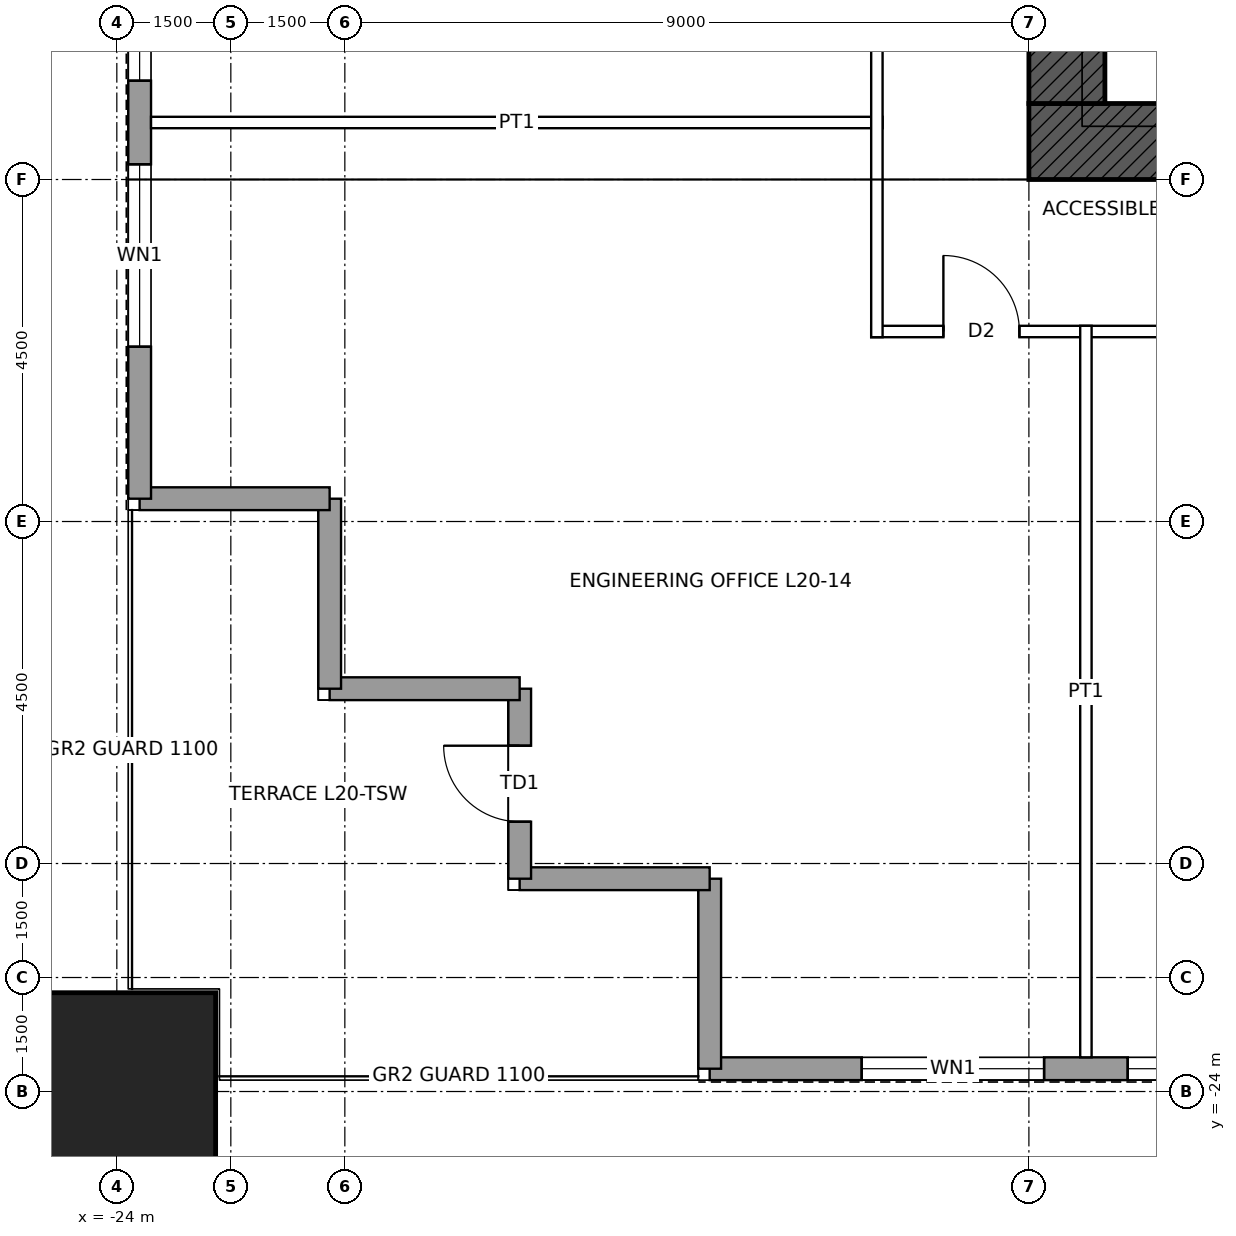
"""IFC4 building model, lengths in metres.
Left out: names, types, materials, properties, quantities, classifications, styles, units other than length and angle.
Written with IfcOpenShell. Run it as: python <this file> out.ifc"""

import sys

from ifc_helpers import new_model, si_unit, direction, frame, frame_2d, origin, origin_2d, place, context, subcontext, project, spatial, rectangle, hollow_rectangle, extrude, element, fill, save


model = new_model("IFC4")
c1 = context("Model", 3, precision=1e-05, world=origin(), true_north=direction((0.0, 1.0)))
c2 = subcontext(c1, "Body", "Model", "MODEL_VIEW")
j1 = project(units=[si_unit("LENGTHUNIT", "METRE"), si_unit("PLANEANGLEUNIT", "RADIAN")], contexts=[c1])
p1 = place(None, origin())
s1 = spatial("IfcSite", under=j1, at=p1, CompositionType="ELEMENT")
p2 = place(p1, origin())
s2 = spatial("IfcBuilding", under=s1, at=p2, CompositionType="ELEMENT")
p3 = place(p2, frame((0.0, 0.0, 104.4)))
s3 = spatial("IfcBuildingStorey", under=s2, at=p3, CompositionType="ELEMENT", Elevation=104.4)
p4 = place(p3, frame((-24.0, -24.0, 0.0), z_axis=(0.0, 0.0, 1.0), x_axis=(1.0, 0.0, 0.0)))
e1 = element("IfcColumn", 1, at=p4, inside=s3, PredefinedType="COLUMN", context=c2, shape_type="SweptSolid", body=[
    extrude(hollow_rectangle(XDim=2.6, YDim=2.6, WallThickness=0.13, at=origin_2d()), origin(), (0.0, 0.0, 1.0), 4.5),
])
p5 = place(p3, frame((12.0, -11.5, 0.0), z_axis=(0.0, 0.0, 1.0), x_axis=(-1.0, 0.0, 0.0)))
e2 = element("IfcWall", 2, at=p5, inside=s3, PredefinedType="SHEAR", context=c2, shape_type="SweptSolid", body=[
    extrude(rectangle(XDim=24.0, YDim=1.0, at=frame_2d((12.0, 0.0))), origin(), (0.0, 0.0, 1.0), 4.5),
])
p6 = place(p5, frame((11.5, 0.0, 0.0)))
e3 = element("IfcOpeningElement", 3, at=p6, cuts=e2, PredefinedType="OPENING", context=c2, shape_type="SweptSolid", body=[
    extrude(rectangle(XDim=1.0, YDim=2.1, at=frame_2d((0.5, 1.05))), frame((0.0, 0.51, 0.0), z_axis=(0.0, -1.0, 0.0), x_axis=(1.0, 0.0, 0.0)), (0.0, 0.0, 1.0), 1.02),
])
p7 = place(p5, frame((1.0, 0.0, 0.0)))
e4 = element("IfcOpeningElement", 4, at=p7, cuts=e2, PredefinedType="OPENING", context=c2, shape_type="SweptSolid", body=[
    extrude(rectangle(XDim=1.0, YDim=2.4, at=frame_2d((0.5, 1.2))), frame((0.0, 0.51, 0.0), z_axis=(0.0, -1.0, 0.0), x_axis=(1.0, 0.0, 0.0)), (0.0, 0.0, 1.0), 1.02),
])
p8 = place(p3, frame((-11.5, -11.0, 0.0), z_axis=(0.0, 0.0, 1.0), x_axis=(0.0, 1.0, 0.0)))
e5 = element("IfcWall", 5, at=p8, inside=s3, PredefinedType="SHEAR", context=c2, shape_type="SweptSolid", body=[
    extrude(rectangle(XDim=22.0, YDim=1.0, at=frame_2d((11.0, 0.0))), origin(), (0.0, 0.0, 1.0), 4.5),
])
p9 = place(p8, frame((10.5, 0.0, 0.0)))
e6 = element("IfcOpeningElement", 6, at=p9, cuts=e5, PredefinedType="OPENING", context=c2, shape_type="SweptSolid", body=[
    extrude(rectangle(XDim=1.0, YDim=2.4, at=frame_2d((0.5, 1.2))), frame((0.0, 0.51, 0.0), z_axis=(0.0, -1.0, 0.0), x_axis=(1.0, 0.0, 0.0)), (0.0, 0.0, 1.0), 1.02),
])
p10 = place(p3, frame((16.2, -23.7, 0.0), z_axis=(0.0, 0.0, 1.0), x_axis=(-1.0, 0.0, 0.0)))
e7 = element("IfcWall", 7, at=p10, inside=s3, PredefinedType="SOLIDWALL", context=c2, shape_type="SweptSolid", body=[
    extrude(rectangle(XDim=32.4, YDim=0.3, at=frame_2d((16.2, 0.0))), origin(), (0.0, 0.0, 1.0), 4.3),
])
p11 = place(p10, frame((2.0, 0.0, 1.0)))
e8 = element("IfcOpeningElement", 8, at=p11, cuts=e7, PredefinedType="OPENING", context=c2, shape_type="SweptSolid", body=[
    extrude(rectangle(XDim=2.4, YDim=1.2, at=frame_2d((1.2, 0.6))), frame((0.0, 0.16, 0.0), z_axis=(0.0, -1.0, 0.0), x_axis=(1.0, 0.0, 0.0)), (0.0, 0.0, 1.0), 0.32),
])
p12 = place(p10, frame((5.5, 0.0, 1.0)))
e9 = element("IfcOpeningElement", 9, at=p12, cuts=e7, PredefinedType="OPENING", context=c2, shape_type="SweptSolid", body=[
    extrude(rectangle(XDim=2.4, YDim=1.2, at=frame_2d((1.2, 0.6))), frame((0.0, 0.16, 0.0), z_axis=(0.0, -1.0, 0.0), x_axis=(1.0, 0.0, 0.0)), (0.0, 0.0, 1.0), 0.32),
])
p13 = place(p10, frame((9.5, 0.0, 1.0)))
e10 = element("IfcOpeningElement", 10, at=p13, cuts=e7, PredefinedType="OPENING", context=c2, shape_type="SweptSolid", body=[
    extrude(rectangle(XDim=2.4, YDim=1.2, at=frame_2d((1.2, 0.6))), frame((0.0, 0.16, 0.0), z_axis=(0.0, -1.0, 0.0), x_axis=(1.0, 0.0, 0.0)), (0.0, 0.0, 1.0), 0.32),
])
p14 = place(p10, frame((13.0, 0.0, 1.0)))
e11 = element("IfcOpeningElement", 11, at=p14, cuts=e7, PredefinedType="OPENING", context=c2, shape_type="SweptSolid", body=[
    extrude(rectangle(XDim=2.4, YDim=1.2, at=frame_2d((1.2, 0.6))), frame((0.0, 0.16, 0.0), z_axis=(0.0, -1.0, 0.0), x_axis=(1.0, 0.0, 0.0)), (0.0, 0.0, 1.0), 0.32),
])
p15 = place(p10, frame((17.0, 0.0, 1.0)))
e12 = element("IfcOpeningElement", 12, at=p15, cuts=e7, PredefinedType="OPENING", context=c2, shape_type="SweptSolid", body=[
    extrude(rectangle(XDim=2.4, YDim=1.2, at=frame_2d((1.2, 0.6))), frame((0.0, 0.16, 0.0), z_axis=(0.0, -1.0, 0.0), x_axis=(1.0, 0.0, 0.0)), (0.0, 0.0, 1.0), 0.32),
])
p16 = place(p10, frame((20.5, 0.0, 1.0)))
e13 = element("IfcOpeningElement", 13, at=p16, cuts=e7, PredefinedType="OPENING", context=c2, shape_type="SweptSolid", body=[
    extrude(rectangle(XDim=2.4, YDim=1.2, at=frame_2d((1.2, 0.6))), frame((0.0, 0.16, 0.0), z_axis=(0.0, -1.0, 0.0), x_axis=(1.0, 0.0, 0.0)), (0.0, 0.0, 1.0), 0.32),
])
p17 = place(p10, frame((24.5, 0.0, 1.0)))
e14 = element("IfcOpeningElement", 14, at=p17, cuts=e7, PredefinedType="OPENING", context=c2, shape_type="SweptSolid", body=[
    extrude(rectangle(XDim=2.4, YDim=1.2, at=frame_2d((1.2, 0.6))), frame((0.0, 0.16, 0.0), z_axis=(0.0, -1.0, 0.0), x_axis=(1.0, 0.0, 0.0)), (0.0, 0.0, 1.0), 0.32),
])
p18 = place(p10, frame((28.0, 0.0, 1.0)))
e15 = element("IfcOpeningElement", 15, at=p18, cuts=e7, PredefinedType="OPENING", context=c2, shape_type="SweptSolid", body=[
    extrude(rectangle(XDim=2.4, YDim=1.2, at=frame_2d((1.2, 0.6))), frame((0.0, 0.16, 0.0), z_axis=(0.0, -1.0, 0.0), x_axis=(1.0, 0.0, 0.0)), (0.0, 0.0, 1.0), 0.32),
])
for number, where, z_axis, x_axis in (
    (16, (-16.2, -23.7, 0.0), (0.0, 0.0, 1.0), (0.0, 1.0, 0.0)),
    (17, (-16.2, -21.2, 0.0), (0.0, 0.0, 1.0), (-1.0, 0.0, 0.0)),
):
    element("IfcWall", number, at=place(p3, frame(where, z_axis=z_axis, x_axis=x_axis)), inside=s3, PredefinedType="SOLIDWALL", context=c2, shape_type="SweptSolid", body=[
        extrude(rectangle(XDim=2.5, YDim=0.3, at=frame_2d((1.25, 0.0))), origin(), (0.0, 0.0, 1.0), 4.3),
    ])
p19 = place(p3, frame((-18.7, -21.2, 0.0), z_axis=(0.0, 0.0, 1.0), x_axis=(0.0, 1.0, 0.0)))
e18 = element("IfcWall", 18, at=p19, inside=s3, PredefinedType="SOLIDWALL", context=c2, shape_type="SweptSolid", body=[
    extrude(rectangle(XDim=2.5, YDim=0.3, at=frame_2d((1.25, 0.0))), origin(), (0.0, 0.0, 1.0), 4.3),
])
p20 = place(p19, frame((0.75, 0.0, 0.0)))
e19 = element("IfcOpeningElement", 19, at=p20, cuts=e18, PredefinedType="OPENING", context=c2, shape_type="SweptSolid", body=[
    extrude(rectangle(XDim=1.0, YDim=2.4, at=frame_2d((0.5, 1.2))), frame((0.0, 0.16, 0.0), z_axis=(0.0, -1.0, 0.0), x_axis=(1.0, 0.0, 0.0)), (0.0, 0.0, 1.0), 0.32),
])
for number, where, z_axis, x_axis in (
    (20, (-18.7, -18.7, 0.0), (0.0, 0.0, 1.0), (-1.0, 0.0, 0.0)),
    (21, (-21.2, -18.7, 0.0), (0.0, 0.0, 1.0), (0.0, 1.0, 0.0)),
    (22, (-21.2, -16.2, 0.0), (0.0, 0.0, 1.0), (-1.0, 0.0, 0.0)),
):
    element("IfcWall", number, at=place(p3, frame(where, z_axis=z_axis, x_axis=x_axis)), inside=s3, PredefinedType="SOLIDWALL", context=c2, shape_type="SweptSolid", body=[
        extrude(rectangle(XDim=2.5, YDim=0.3, at=frame_2d((1.25, 0.0))), origin(), (0.0, 0.0, 1.0), 4.3),
    ])
p21 = place(p3, frame((-23.7, -16.2, 0.0), z_axis=(0.0, 0.0, 1.0), x_axis=(0.0, 1.0, 0.0)))
e23 = element("IfcWall", 23, at=p21, inside=s3, PredefinedType="SOLIDWALL", context=c2, shape_type="SweptSolid", body=[
    extrude(rectangle(XDim=32.4, YDim=0.3, at=frame_2d((16.2, 0.0))), origin(), (0.0, 0.0, 1.0), 4.3),
])
p22 = place(p21, frame((2.0, 0.0, 1.0)))
e24 = element("IfcOpeningElement", 24, at=p22, cuts=e23, PredefinedType="OPENING", context=c2, shape_type="SweptSolid", body=[
    extrude(rectangle(XDim=2.4, YDim=1.2, at=frame_2d((1.2, 0.6))), frame((0.0, 0.16, 0.0), z_axis=(0.0, -1.0, 0.0), x_axis=(1.0, 0.0, 0.0)), (0.0, 0.0, 1.0), 0.32),
])
p23 = place(p21, frame((5.5, 0.0, 1.0)))
e25 = element("IfcOpeningElement", 25, at=p23, cuts=e23, PredefinedType="OPENING", context=c2, shape_type="SweptSolid", body=[
    extrude(rectangle(XDim=2.4, YDim=1.2, at=frame_2d((1.2, 0.6))), frame((0.0, 0.16, 0.0), z_axis=(0.0, -1.0, 0.0), x_axis=(1.0, 0.0, 0.0)), (0.0, 0.0, 1.0), 0.32),
])
p24 = place(p21, frame((9.5, 0.0, 1.0)))
e26 = element("IfcOpeningElement", 26, at=p24, cuts=e23, PredefinedType="OPENING", context=c2, shape_type="SweptSolid", body=[
    extrude(rectangle(XDim=2.4, YDim=1.2, at=frame_2d((1.2, 0.6))), frame((0.0, 0.16, 0.0), z_axis=(0.0, -1.0, 0.0), x_axis=(1.0, 0.0, 0.0)), (0.0, 0.0, 1.0), 0.32),
])
p25 = place(p21, frame((13.0, 0.0, 1.0)))
e27 = element("IfcOpeningElement", 27, at=p25, cuts=e23, PredefinedType="OPENING", context=c2, shape_type="SweptSolid", body=[
    extrude(rectangle(XDim=2.4, YDim=1.2, at=frame_2d((1.2, 0.6))), frame((0.0, 0.16, 0.0), z_axis=(0.0, -1.0, 0.0), x_axis=(1.0, 0.0, 0.0)), (0.0, 0.0, 1.0), 0.32),
])
p26 = place(p21, frame((17.0, 0.0, 1.0)))
e28 = element("IfcOpeningElement", 28, at=p26, cuts=e23, PredefinedType="OPENING", context=c2, shape_type="SweptSolid", body=[
    extrude(rectangle(XDim=2.4, YDim=1.2, at=frame_2d((1.2, 0.6))), frame((0.0, 0.16, 0.0), z_axis=(0.0, -1.0, 0.0), x_axis=(1.0, 0.0, 0.0)), (0.0, 0.0, 1.0), 0.32),
])
p27 = place(p21, frame((20.5, 0.0, 1.0)))
e29 = element("IfcOpeningElement", 29, at=p27, cuts=e23, PredefinedType="OPENING", context=c2, shape_type="SweptSolid", body=[
    extrude(rectangle(XDim=2.4, YDim=1.2, at=frame_2d((1.2, 0.6))), frame((0.0, 0.16, 0.0), z_axis=(0.0, -1.0, 0.0), x_axis=(1.0, 0.0, 0.0)), (0.0, 0.0, 1.0), 0.32),
])
p28 = place(p21, frame((24.5, 0.0, 1.0)))
e30 = element("IfcOpeningElement", 30, at=p28, cuts=e23, PredefinedType="OPENING", context=c2, shape_type="SweptSolid", body=[
    extrude(rectangle(XDim=2.4, YDim=1.2, at=frame_2d((1.2, 0.6))), frame((0.0, 0.16, 0.0), z_axis=(0.0, -1.0, 0.0), x_axis=(1.0, 0.0, 0.0)), (0.0, 0.0, 1.0), 0.32),
])
p29 = place(p21, frame((28.0, 0.0, 1.0)))
e31 = element("IfcOpeningElement", 31, at=p29, cuts=e23, PredefinedType="OPENING", context=c2, shape_type="SweptSolid", body=[
    extrude(rectangle(XDim=2.4, YDim=1.2, at=frame_2d((1.2, 0.6))), frame((0.0, 0.16, 0.0), z_axis=(0.0, -1.0, 0.0), x_axis=(1.0, 0.0, 0.0)), (0.0, 0.0, 1.0), 0.32),
])
p30 = place(p3, frame((-14.075, -14.0, 0.0), z_axis=(0.0, 0.0, 1.0), x_axis=(1.0, 0.0, 0.0)))
e32 = element("IfcWall", 32, at=p30, inside=s3, PredefinedType="PARTITIONING", context=c2, shape_type="SweptSolid", body=[
    extrude(rectangle(XDim=28.15, YDim=0.15, at=frame_2d((14.075, 0.0))), origin(), (0.0, 0.0, 1.0), 4.3),
])
p31 = place(p30, frame((20.675, 0.0, 0.0)))
e33 = element("IfcOpeningElement", 33, at=p31, cuts=e32, PredefinedType="OPENING", context=c2, shape_type="SweptSolid", body=[
    extrude(rectangle(XDim=1.8, YDim=2.4, at=frame_2d((0.9, 1.2))), frame((0.0, 0.085, 0.0), z_axis=(0.0, -1.0, 0.0), x_axis=(1.0, 0.0, 0.0)), (0.0, 0.0, 1.0), 0.17),
])
p32 = place(p30, frame((13.175, 0.0, 0.0)))
e34 = element("IfcOpeningElement", 34, at=p32, cuts=e32, PredefinedType="OPENING", context=c2, shape_type="SweptSolid", body=[
    extrude(rectangle(XDim=1.8, YDim=2.4, at=frame_2d((0.9, 1.2))), frame((0.0, 0.085, 0.0), z_axis=(0.0, -1.0, 0.0), x_axis=(1.0, 0.0, 0.0)), (0.0, 0.0, 1.0), 0.17),
])
p33 = place(p30, frame((5.675, 0.0, 0.0)))
e35 = element("IfcOpeningElement", 35, at=p33, cuts=e32, PredefinedType="OPENING", context=c2, shape_type="SweptSolid", body=[
    extrude(rectangle(XDim=1.8, YDim=2.4, at=frame_2d((0.9, 1.2))), frame((0.0, 0.085, 0.0), z_axis=(0.0, -1.0, 0.0), x_axis=(1.0, 0.0, 0.0)), (0.0, 0.0, 1.0), 0.17),
])
p34 = place(p30, frame((26.2, 0.0, 0.0)))
e36 = element("IfcOpeningElement", 36, at=p34, cuts=e32, PredefinedType="OPENING", context=c2, shape_type="SweptSolid", body=[
    extrude(rectangle(XDim=1.0, YDim=2.1, at=frame_2d((0.5, 1.05))), frame((0.0, 0.085, 0.0), z_axis=(0.0, -1.0, 0.0), x_axis=(1.0, 0.0, 0.0)), (0.0, 0.0, 1.0), 0.17),
])
p35 = place(p30, frame((0.95, 0.0, 0.0)))
e37 = element("IfcOpeningElement", 37, at=p35, cuts=e32, PredefinedType="OPENING", context=c2, shape_type="SweptSolid", body=[
    extrude(rectangle(XDim=1.0, YDim=2.1, at=frame_2d((0.5, 1.05))), frame((0.0, 0.085, 0.0), z_axis=(0.0, -1.0, 0.0), x_axis=(1.0, 0.0, 0.0)), (0.0, 0.0, 1.0), 0.17),
])
p36 = place(p3, frame((-23.55, -11.25, 0.0), z_axis=(0.0, 0.0, 1.0), x_axis=(1.0, 0.0, 0.0)))
e38 = element("IfcWall", 38, at=p36, inside=s3, PredefinedType="PARTITIONING", context=c2, shape_type="SweptSolid", body=[
    extrude(rectangle(XDim=9.625, YDim=0.15, at=frame_2d((4.812, 0.0))), origin(), (0.0, 0.0, 1.0), 3.431),
])
p37 = place(p3, frame((-14.0, -14.075, 0.0), z_axis=(0.0, 0.0, 1.0), x_axis=(0.0, 1.0, 0.0)))
e39 = element("IfcWall", 39, at=p37, inside=s3, PredefinedType="PARTITIONING", context=c2, shape_type="SweptSolid", body=[
    extrude(rectangle(XDim=28.15, YDim=0.15, at=frame_2d((14.075, 0.0))), origin(), (0.0, 0.0, 1.0), 4.3),
])
p38 = place(p37, frame((6.075, 0.0, 0.0)))
e40 = element("IfcOpeningElement", 40, at=p38, cuts=e39, PredefinedType="OPENING", context=c2, shape_type="SweptSolid", body=[
    extrude(rectangle(XDim=1.0, YDim=2.1, at=frame_2d((0.5, 1.05))), frame((0.0, 0.085, 0.0), z_axis=(0.0, -1.0, 0.0), x_axis=(1.0, 0.0, 0.0)), (0.0, 0.0, 1.0), 0.17),
])
p39 = place(p37, frame((16.925, 0.0, 0.0)))
e41 = element("IfcOpeningElement", 41, at=p39, cuts=e39, PredefinedType="OPENING", context=c2, shape_type="SweptSolid", body=[
    extrude(rectangle(XDim=1.8, YDim=2.4, at=frame_2d((0.9, 1.2))), frame((0.0, 0.085, 0.0), z_axis=(0.0, -1.0, 0.0), x_axis=(1.0, 0.0, 0.0)), (0.0, 0.0, 1.0), 0.17),
])
p40 = place(p3, frame((-11.25, -23.55, 0.0), z_axis=(0.0, 0.0, 1.0), x_axis=(0.0, 1.0, 0.0)))
e42 = element("IfcWall", 42, at=p40, inside=s3, PredefinedType="PARTITIONING", context=c2, shape_type="SweptSolid", body=[
    extrude(rectangle(XDim=9.625, YDim=0.15, at=frame_2d((4.812, 0.0))), origin(), (0.0, 0.0, 1.0), 3.431),
])
p41 = place(p17, origin())
e43 = element("IfcWindow", 43, at=p41, inside=s3, PartitioningType="SINGLE_PANEL", PredefinedType="WINDOW", context=c2, shape_type="SweptSolid", body=[
    extrude(rectangle(XDim=2.4, YDim=1.2, at=frame_2d((1.2, 0.6))), frame((0.0, 0.03, 0.0), z_axis=(0.0, -1.0, 0.0), x_axis=(1.0, 0.0, 0.0)), (0.0, 0.0, 1.0), 0.06),
])
fill(e14, e43)
p42 = place(p18, origin())
e44 = element("IfcWindow", 44, at=p42, inside=s3, PartitioningType="SINGLE_PANEL", PredefinedType="WINDOW", context=c2, shape_type="SweptSolid", body=[
    extrude(rectangle(XDim=2.4, YDim=1.2, at=frame_2d((1.2, 0.6))), frame((0.0, 0.03, 0.0), z_axis=(0.0, -1.0, 0.0), x_axis=(1.0, 0.0, 0.0)), (0.0, 0.0, 1.0), 0.06),
])
fill(e15, e44)
p43 = place(p20, origin())
e45 = element("IfcDoor", 45, at=p43, inside=s3, OperationType="SINGLE_SWING_RIGHT", PredefinedType="DOOR", context=c2, shape_type="SweptSolid", body=[
    extrude(rectangle(XDim=1.0, YDim=2.4, at=frame_2d((0.5, 1.2))), frame((0.0, 0.025, 0.0), z_axis=(0.0, -1.0, 0.0), x_axis=(1.0, 0.0, 0.0)), (0.0, 0.0, 1.0), 0.05),
])
fill(e19, e45)
p44 = place(p22, origin())
e46 = element("IfcWindow", 46, at=p44, inside=s3, PartitioningType="SINGLE_PANEL", PredefinedType="WINDOW", context=c2, shape_type="SweptSolid", body=[
    extrude(rectangle(XDim=2.4, YDim=1.2, at=frame_2d((1.2, 0.6))), frame((0.0, 0.03, 0.0), z_axis=(0.0, -1.0, 0.0), x_axis=(1.0, 0.0, 0.0)), (0.0, 0.0, 1.0), 0.06),
])
fill(e24, e46)
p45 = place(p23, origin())
e47 = element("IfcWindow", 47, at=p45, inside=s3, PartitioningType="SINGLE_PANEL", PredefinedType="WINDOW", context=c2, shape_type="SweptSolid", body=[
    extrude(rectangle(XDim=2.4, YDim=1.2, at=frame_2d((1.2, 0.6))), frame((0.0, 0.03, 0.0), z_axis=(0.0, -1.0, 0.0), x_axis=(1.0, 0.0, 0.0)), (0.0, 0.0, 1.0), 0.06),
])
fill(e25, e47)
p46 = place(p35, origin())
e48 = element("IfcDoor", 48, at=p46, inside=s3, OperationType="SINGLE_SWING_LEFT", PredefinedType="DOOR", context=c2, shape_type="SweptSolid", body=[
    extrude(rectangle(XDim=1.0, YDim=2.1, at=frame_2d((0.5, 1.05))), frame((0.0, 0.025, 0.0), z_axis=(0.0, -1.0, 0.0), x_axis=(1.0, 0.0, 0.0)), (0.0, 0.0, 1.0), 0.05),
])
fill(e37, e48)
save(model, sys.argv[1])
